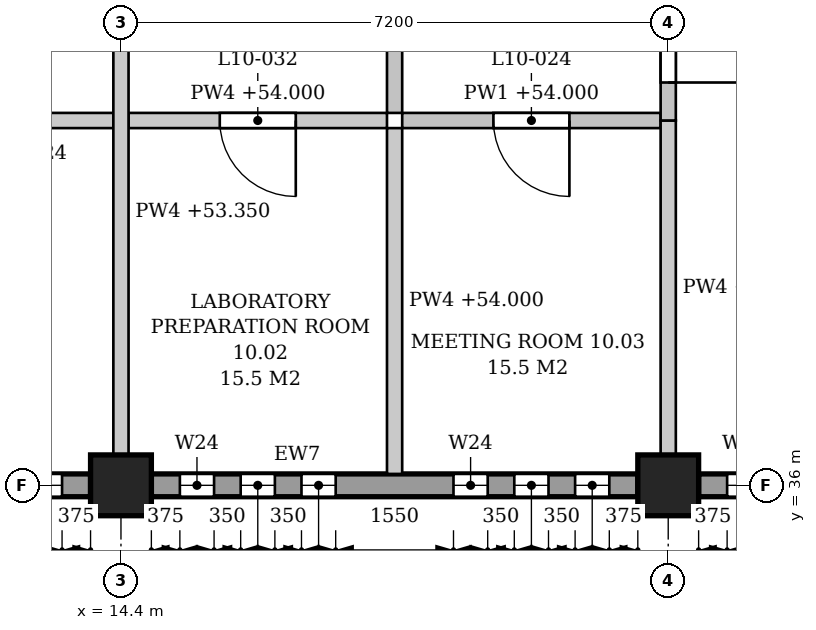
"""IFC4 building model, lengths in metres.
Left out: names, types, materials, properties, quantities, classifications, styles, units other than length and angle.
Written with IfcOpenShell. Run it as: python <this file> out.ifc"""

import sys

from ifc_helpers import new_model, si_unit, direction, frame, frame_2d, origin, origin_2d, place, context, subcontext, project, spatial, polyline, rectangle, outline, extrude, element, fill, save


model = new_model("IFC4")
c1 = context("Model", 3, precision=1e-05, world=origin(), true_north=direction((0.0, 1.0)))
c2 = subcontext(c1, "Body", "Model", "MODEL_VIEW")
j1 = project(units=[si_unit("LENGTHUNIT", "METRE"), si_unit("PLANEANGLEUNIT", "RADIAN")], contexts=[c1])
p1 = place(None, origin())
s1 = spatial("IfcSite", under=j1, at=p1, CompositionType="ELEMENT")
p2 = place(p1, origin())
s2 = spatial("IfcBuilding", under=s1, at=p2, CompositionType="ELEMENT")
p3 = place(p2, frame((0.0, 0.0, 49.8)))
s3 = spatial("IfcBuildingStorey", under=s2, at=p3, CompositionType="ELEMENT", Elevation=49.8)
for number, where, z_axis, x_axis in (
    (1, (14.4, 36.0, 0.0), (0.0, 0.0, 1.0), (1.0, 0.0, 0.0)),
    (2, (21.6, 36.0, 0.0), (0.0, 0.0, 1.0), (1.0, 0.0, 0.0)),
):
    element("IfcColumn", number, at=place(p3, frame(where, z_axis=z_axis, x_axis=x_axis)), inside=s3, PredefinedType="COLUMN", context=c2, shape_type="SweptSolid", body=[
        extrude(rectangle(XDim=0.8, YDim=0.8, at=origin_2d()), origin(), (0.0, 0.0, 1.0), 4.5),
    ])
p4 = place(p3, frame((7.6, 36.0, 0.0), z_axis=(0.0, 0.0, 1.0), x_axis=(1.0, 0.0, 0.0)))
e3 = element("IfcWall", 3, at=p4, inside=s3, PredefinedType="STANDARD", context=c2, shape_type="SweptSolid", body=[
    extrude(rectangle(XDim=6.4, YDim=0.3, at=frame_2d((3.2, 0.0))), origin(), (0.0, 0.0, 1.0), 3.6),
])
p5 = place(p4, frame((0.375, 0.0, 0.9)))
e4 = element("IfcOpeningElement", 4, at=p5, cuts=e3, PredefinedType="OPENING", context=c2, shape_type="SweptSolid", body=[
    extrude(outline(polyline([(0.0, 0.0), (0.45, 0.0), (0.45, 2.35), (0.225, 2.6), (0.0, 2.35), (0.0, 0.0)])), frame((0.0, 0.16, 0.0), z_axis=(0.0, -1.0, 0.0), x_axis=(1.0, 0.0, 0.0)), (0.0, 0.0, 1.0), 0.32),
])
p6 = place(p4, frame((1.175, 0.0, 0.9)))
e5 = element("IfcOpeningElement", 5, at=p6, cuts=e3, PredefinedType="OPENING", context=c2, shape_type="SweptSolid", body=[
    extrude(outline(polyline([(0.0, 0.0), (0.45, 0.0), (0.45, 2.35), (0.225, 2.6), (0.0, 2.35), (0.0, 0.0)])), frame((0.0, 0.16, 0.0), z_axis=(0.0, -1.0, 0.0), x_axis=(1.0, 0.0, 0.0)), (0.0, 0.0, 1.0), 0.32),
])
p7 = place(p4, frame((1.975, 0.0, 0.9)))
e6 = element("IfcOpeningElement", 6, at=p7, cuts=e3, PredefinedType="OPENING", context=c2, shape_type="SweptSolid", body=[
    extrude(outline(polyline([(0.0, 0.0), (0.45, 0.0), (0.45, 2.35), (0.225, 2.6), (0.0, 2.35), (0.0, 0.0)])), frame((0.0, 0.16, 0.0), z_axis=(0.0, -1.0, 0.0), x_axis=(1.0, 0.0, 0.0)), (0.0, 0.0, 1.0), 0.32),
])
p8 = place(p4, frame((3.975, 0.0, 0.9)))
e7 = element("IfcOpeningElement", 7, at=p8, cuts=e3, PredefinedType="OPENING", context=c2, shape_type="SweptSolid", body=[
    extrude(outline(polyline([(0.0, 0.0), (0.45, 0.0), (0.45, 2.35), (0.225, 2.6), (0.0, 2.35), (0.0, 0.0)])), frame((0.0, 0.16, 0.0), z_axis=(0.0, -1.0, 0.0), x_axis=(1.0, 0.0, 0.0)), (0.0, 0.0, 1.0), 0.32),
])
p9 = place(p4, frame((4.775, 0.0, 0.9)))
e8 = element("IfcOpeningElement", 8, at=p9, cuts=e3, PredefinedType="OPENING", context=c2, shape_type="SweptSolid", body=[
    extrude(outline(polyline([(0.0, 0.0), (0.45, 0.0), (0.45, 2.35), (0.225, 2.6), (0.0, 2.35), (0.0, 0.0)])), frame((0.0, 0.16, 0.0), z_axis=(0.0, -1.0, 0.0), x_axis=(1.0, 0.0, 0.0)), (0.0, 0.0, 1.0), 0.32),
])
p10 = place(p4, frame((5.575, 0.0, 0.9)))
e9 = element("IfcOpeningElement", 9, at=p10, cuts=e3, PredefinedType="OPENING", context=c2, shape_type="SweptSolid", body=[
    extrude(outline(polyline([(0.0, 0.0), (0.45, 0.0), (0.45, 2.35), (0.225, 2.6), (0.0, 2.35), (0.0, 0.0)])), frame((0.0, 0.16, 0.0), z_axis=(0.0, -1.0, 0.0), x_axis=(1.0, 0.0, 0.0)), (0.0, 0.0, 1.0), 0.32),
])
p11 = place(p3, frame((14.8, 36.0, 0.0), z_axis=(0.0, 0.0, 1.0), x_axis=(1.0, 0.0, 0.0)))
e10 = element("IfcWall", 10, at=p11, inside=s3, PredefinedType="STANDARD", context=c2, shape_type="SweptSolid", body=[
    extrude(rectangle(XDim=6.4, YDim=0.3, at=frame_2d((3.2, 0.0))), origin(), (0.0, 0.0, 1.0), 3.6),
])
p12 = place(p11, frame((0.375, 0.0, 0.9)))
e11 = element("IfcOpeningElement", 11, at=p12, cuts=e10, PredefinedType="OPENING", context=c2, shape_type="SweptSolid", body=[
    extrude(outline(polyline([(0.0, 0.0), (0.45, 0.0), (0.45, 2.35), (0.225, 2.6), (0.0, 2.35), (0.0, 0.0)])), frame((0.0, 0.16, 0.0), z_axis=(0.0, -1.0, 0.0), x_axis=(1.0, 0.0, 0.0)), (0.0, 0.0, 1.0), 0.32),
])
p13 = place(p11, frame((1.175, 0.0, 0.9)))
e12 = element("IfcOpeningElement", 12, at=p13, cuts=e10, PredefinedType="OPENING", context=c2, shape_type="SweptSolid", body=[
    extrude(outline(polyline([(0.0, 0.0), (0.45, 0.0), (0.45, 2.35), (0.225, 2.6), (0.0, 2.35), (0.0, 0.0)])), frame((0.0, 0.16, 0.0), z_axis=(0.0, -1.0, 0.0), x_axis=(1.0, 0.0, 0.0)), (0.0, 0.0, 1.0), 0.32),
])
p14 = place(p11, frame((1.975, 0.0, 0.9)))
e13 = element("IfcOpeningElement", 13, at=p14, cuts=e10, PredefinedType="OPENING", context=c2, shape_type="SweptSolid", body=[
    extrude(outline(polyline([(0.0, 0.0), (0.45, 0.0), (0.45, 2.35), (0.225, 2.6), (0.0, 2.35), (0.0, 0.0)])), frame((0.0, 0.16, 0.0), z_axis=(0.0, -1.0, 0.0), x_axis=(1.0, 0.0, 0.0)), (0.0, 0.0, 1.0), 0.32),
])
p15 = place(p11, frame((3.975, 0.0, 0.9)))
e14 = element("IfcOpeningElement", 14, at=p15, cuts=e10, PredefinedType="OPENING", context=c2, shape_type="SweptSolid", body=[
    extrude(outline(polyline([(0.0, 0.0), (0.45, 0.0), (0.45, 2.35), (0.225, 2.6), (0.0, 2.35), (0.0, 0.0)])), frame((0.0, 0.16, 0.0), z_axis=(0.0, -1.0, 0.0), x_axis=(1.0, 0.0, 0.0)), (0.0, 0.0, 1.0), 0.32),
])
p16 = place(p11, frame((4.775, 0.0, 0.9)))
e15 = element("IfcOpeningElement", 15, at=p16, cuts=e10, PredefinedType="OPENING", context=c2, shape_type="SweptSolid", body=[
    extrude(outline(polyline([(0.0, 0.0), (0.45, 0.0), (0.45, 2.35), (0.225, 2.6), (0.0, 2.35), (0.0, 0.0)])), frame((0.0, 0.16, 0.0), z_axis=(0.0, -1.0, 0.0), x_axis=(1.0, 0.0, 0.0)), (0.0, 0.0, 1.0), 0.32),
])
p17 = place(p11, frame((5.575, 0.0, 0.9)))
e16 = element("IfcOpeningElement", 16, at=p17, cuts=e10, PredefinedType="OPENING", context=c2, shape_type="SweptSolid", body=[
    extrude(outline(polyline([(0.0, 0.0), (0.45, 0.0), (0.45, 2.35), (0.225, 2.6), (0.0, 2.35), (0.0, 0.0)])), frame((0.0, 0.16, 0.0), z_axis=(0.0, -1.0, 0.0), x_axis=(1.0, 0.0, 0.0)), (0.0, 0.0, 1.0), 0.32),
])
p18 = place(p3, frame((22.0, 36.0, 0.0), z_axis=(0.0, 0.0, 1.0), x_axis=(1.0, 0.0, 0.0)))
e17 = element("IfcWall", 17, at=p18, inside=s3, PredefinedType="STANDARD", context=c2, shape_type="SweptSolid", body=[
    extrude(rectangle(XDim=6.4, YDim=0.3, at=frame_2d((3.2, 0.0))), origin(), (0.0, 0.0, 1.0), 3.6),
])
p19 = place(p18, frame((0.375, 0.0, 0.9)))
e18 = element("IfcOpeningElement", 18, at=p19, cuts=e17, PredefinedType="OPENING", context=c2, shape_type="SweptSolid", body=[
    extrude(outline(polyline([(0.0, 0.0), (0.45, 0.0), (0.45, 2.35), (0.225, 2.6), (0.0, 2.35), (0.0, 0.0)])), frame((0.0, 0.16, 0.0), z_axis=(0.0, -1.0, 0.0), x_axis=(1.0, 0.0, 0.0)), (0.0, 0.0, 1.0), 0.32),
])
p20 = place(p18, frame((1.175, 0.0, 0.9)))
e19 = element("IfcOpeningElement", 19, at=p20, cuts=e17, PredefinedType="OPENING", context=c2, shape_type="SweptSolid", body=[
    extrude(outline(polyline([(0.0, 0.0), (0.45, 0.0), (0.45, 2.35), (0.225, 2.6), (0.0, 2.35), (0.0, 0.0)])), frame((0.0, 0.16, 0.0), z_axis=(0.0, -1.0, 0.0), x_axis=(1.0, 0.0, 0.0)), (0.0, 0.0, 1.0), 0.32),
])
p21 = place(p18, frame((1.975, 0.0, 0.9)))
e20 = element("IfcOpeningElement", 20, at=p21, cuts=e17, PredefinedType="OPENING", context=c2, shape_type="SweptSolid", body=[
    extrude(outline(polyline([(0.0, 0.0), (0.45, 0.0), (0.45, 2.35), (0.225, 2.6), (0.0, 2.35), (0.0, 0.0)])), frame((0.0, 0.16, 0.0), z_axis=(0.0, -1.0, 0.0), x_axis=(1.0, 0.0, 0.0)), (0.0, 0.0, 1.0), 0.32),
])
p22 = place(p18, frame((3.975, 0.0, 0.9)))
e21 = element("IfcOpeningElement", 21, at=p22, cuts=e17, PredefinedType="OPENING", context=c2, shape_type="SweptSolid", body=[
    extrude(outline(polyline([(0.0, 0.0), (0.45, 0.0), (0.45, 2.35), (0.225, 2.6), (0.0, 2.35), (0.0, 0.0)])), frame((0.0, 0.16, 0.0), z_axis=(0.0, -1.0, 0.0), x_axis=(1.0, 0.0, 0.0)), (0.0, 0.0, 1.0), 0.32),
])
p23 = place(p18, frame((4.775, 0.0, 0.9)))
e22 = element("IfcOpeningElement", 22, at=p23, cuts=e17, PredefinedType="OPENING", context=c2, shape_type="SweptSolid", body=[
    extrude(outline(polyline([(0.0, 0.0), (0.45, 0.0), (0.45, 2.35), (0.225, 2.6), (0.0, 2.35), (0.0, 0.0)])), frame((0.0, 0.16, 0.0), z_axis=(0.0, -1.0, 0.0), x_axis=(1.0, 0.0, 0.0)), (0.0, 0.0, 1.0), 0.32),
])
p24 = place(p18, frame((5.575, 0.0, 0.9)))
e23 = element("IfcOpeningElement", 23, at=p24, cuts=e17, PredefinedType="OPENING", context=c2, shape_type="SweptSolid", body=[
    extrude(outline(polyline([(0.0, 0.0), (0.45, 0.0), (0.45, 2.35), (0.225, 2.6), (0.0, 2.35), (0.0, 0.0)])), frame((0.0, 0.16, 0.0), z_axis=(0.0, -1.0, 0.0), x_axis=(1.0, 0.0, 0.0)), (0.0, 0.0, 1.0), 0.32),
])
p25 = place(p3, frame((3.7, 40.8, 0.0), z_axis=(0.0, 0.0, 1.0), x_axis=(1.0, 0.0, 0.0)))
e24 = element("IfcWall", 24, at=p25, inside=s3, PredefinedType="PARTITIONING", context=c2, shape_type="SweptSolid", body=[
    extrude(outline(polyline([(0.0, 0.0), (10.6, 0.0), (10.6, 3.55), (10.475, 3.55), (10.475, 4.2), (3.725, 4.2), (3.725, 3.55), (3.275, 3.55), (3.275, 4.2), (0.0, 4.2), (0.0, 0.0)])), frame((0.0, 0.1, 0.0), z_axis=(0.0, -1.0, 0.0), x_axis=(1.0, 0.0, 0.0)), (0.0, 0.0, 1.0), 0.2),
])
p26 = place(p25, frame((1.25, 0.0, 0.0)))
e25 = element("IfcOpeningElement", 25, at=p26, cuts=e24, PredefinedType="OPENING", context=c2, shape_type="SweptSolid", body=[
    extrude(rectangle(XDim=1.0, YDim=2.1, at=frame_2d((0.5, 1.05))), frame((0.0, 0.11, 0.0), z_axis=(0.0, -1.0, 0.0), x_axis=(1.0, 0.0, 0.0)), (0.0, 0.0, 1.0), 0.22),
])
p27 = place(p25, frame((6.55, 0.0, 0.0)))
e26 = element("IfcOpeningElement", 26, at=p27, cuts=e24, PredefinedType="OPENING", context=c2, shape_type="SweptSolid", body=[
    extrude(rectangle(XDim=1.0, YDim=2.1, at=frame_2d((0.5, 1.05))), frame((0.0, 0.11, 0.0), z_axis=(0.0, -1.0, 0.0), x_axis=(1.0, 0.0, 0.0)), (0.0, 0.0, 1.0), 0.22),
])
p28 = place(p3, frame((14.5, 40.8, 0.0), z_axis=(0.0, 0.0, 1.0), x_axis=(1.0, 0.0, 0.0)))
e27 = element("IfcWall", 27, at=p28, inside=s3, PredefinedType="PARTITIONING", context=c2, shape_type="SweptSolid", body=[
    extrude(outline(polyline([(0.0, 0.0), (3.4, 0.0), (3.4, 4.2), (0.125, 4.2), (0.125, 3.55), (0.0, 3.55), (0.0, 0.0)])), frame((0.0, 0.1, 0.0), z_axis=(0.0, -1.0, 0.0), x_axis=(1.0, 0.0, 0.0)), (0.0, 0.0, 1.0), 0.2),
])
p29 = place(p28, frame((1.2, 0.0, 0.0)))
e28 = element("IfcOpeningElement", 28, at=p29, cuts=e27, PredefinedType="OPENING", context=c2, shape_type="SweptSolid", body=[
    extrude(rectangle(XDim=1.0, YDim=2.1, at=frame_2d((0.5, 1.05))), frame((0.0, 0.11, 0.0), z_axis=(0.0, -1.0, 0.0), x_axis=(1.0, 0.0, 0.0)), (0.0, 0.0, 1.0), 0.22),
])
p30 = place(p3, frame((18.1, 40.8, 0.0), z_axis=(0.0, 0.0, 1.0), x_axis=(1.0, 0.0, 0.0)))
e29 = element("IfcWall", 29, at=p30, inside=s3, PredefinedType="PARTITIONING", context=c2, shape_type="SweptSolid", body=[
    extrude(outline(polyline([(0.0, 0.0), (3.4, 0.0), (3.4, 3.55), (3.275, 3.55), (3.275, 4.2), (0.0, 4.2), (0.0, 0.0)])), frame((0.0, 0.1, 0.0), z_axis=(0.0, -1.0, 0.0), x_axis=(1.0, 0.0, 0.0)), (0.0, 0.0, 1.0), 0.2),
])
p31 = place(p30, frame((1.2, 0.0, 0.0)))
e30 = element("IfcOpeningElement", 30, at=p31, cuts=e29, PredefinedType="OPENING", context=c2, shape_type="SweptSolid", body=[
    extrude(rectangle(XDim=1.0, YDim=2.1, at=frame_2d((0.5, 1.05))), frame((0.0, 0.11, 0.0), z_axis=(0.0, -1.0, 0.0), x_axis=(1.0, 0.0, 0.0)), (0.0, 0.0, 1.0), 0.22),
])
p32 = place(p3, frame((14.4, 36.4, 0.0), z_axis=(0.0, 0.0, 1.0), x_axis=(0.0, 1.0, 0.0)))
e31 = element("IfcWall", 31, at=p32, inside=s3, PredefinedType="PARTITIONING", context=c2, shape_type="SweptSolid", body=[
    extrude(rectangle(XDim=6.4, YDim=0.2, at=frame_2d((3.2, 0.0))), origin(), (0.0, 0.0, 1.0), 3.55),
])
p33 = place(p3, frame((18.0, 36.15, 0.0), z_axis=(0.0, 0.0, 1.0), x_axis=(0.0, 1.0, 0.0)))
e32 = element("IfcWall", 32, at=p33, inside=s3, PredefinedType="PARTITIONING", context=c2, shape_type="SweptSolid", body=[
    extrude(outline(polyline([(0.0, 0.0), (4.55, 0.0), (4.55, 4.2), (0.05, 4.2), (0.05, 3.6), (0.0, 3.6), (0.0, 0.0)])), frame((0.0, 0.1, 0.0), z_axis=(0.0, -1.0, 0.0), x_axis=(1.0, 0.0, 0.0)), (0.0, 0.0, 1.0), 0.2),
])
p34 = place(p3, frame((18.0, 40.9, 0.0), z_axis=(0.0, 0.0, 1.0), x_axis=(0.0, 1.0, 0.0)))
e33 = element("IfcWall", 33, at=p34, inside=s3, PredefinedType="PARTITIONING", context=c2, shape_type="SweptSolid", body=[
    extrude(outline(polyline([(0.0, 0.0), (7.0, 0.0), (7.0, 4.2), (2.525, 4.2), (2.525, 3.55), (2.075, 3.55), (2.075, 4.2), (0.0, 4.2), (0.0, 0.0)])), frame((0.0, 0.1, 0.0), z_axis=(0.0, -1.0, 0.0), x_axis=(1.0, 0.0, 0.0)), (0.0, 0.0, 1.0), 0.2),
])
p35 = place(p34, frame((3.0, 0.0, 0.0)))
e34 = element("IfcOpeningElement", 34, at=p35, cuts=e33, PredefinedType="OPENING", context=c2, shape_type="SweptSolid", body=[
    extrude(rectangle(XDim=1.0, YDim=2.1, at=frame_2d((0.5, 1.05))), frame((0.0, 0.11, 0.0), z_axis=(0.0, -1.0, 0.0), x_axis=(1.0, 0.0, 0.0)), (0.0, 0.0, 1.0), 0.22),
])
p36 = place(p3, frame((21.6, 36.4, 0.0), z_axis=(0.0, 0.0, 1.0), x_axis=(0.0, 1.0, 0.0)))
e35 = element("IfcWall", 35, at=p36, inside=s3, PredefinedType="PARTITIONING", context=c2, shape_type="SweptSolid", body=[
    extrude(rectangle(XDim=4.4, YDim=0.2, at=frame_2d((2.2, 0.0))), origin(), (0.0, 0.0, 1.0), 3.55),
])
p37 = place(p3, frame((21.6, 40.8, 0.0), z_axis=(0.0, 0.0, 1.0), x_axis=(0.0, 1.0, 0.0)))
e36 = element("IfcWall", 36, at=p37, inside=s3, PredefinedType="PARTITIONING", context=c2, shape_type="SweptSolid", body=[
    extrude(rectangle(XDim=2.0, YDim=0.2, at=frame_2d((1.0, 0.0))), origin(), (0.0, 0.0, 1.0), 3.55),
])
p38 = place(p37, frame((0.5, 0.0, 0.0)))
e37 = element("IfcOpeningElement", 37, at=p38, cuts=e36, PredefinedType="OPENING", context=c2, shape_type="SweptSolid", body=[
    extrude(rectangle(XDim=1.0, YDim=2.1, at=frame_2d((0.5, 1.05))), frame((0.0, 0.11, 0.0), z_axis=(0.0, -1.0, 0.0), x_axis=(1.0, 0.0, 0.0)), (0.0, 0.0, 1.0), 0.22),
])
p39 = place(p10, origin())
e38 = element("IfcWindow", 38, at=p39, inside=s3, PartitioningType="SINGLE_PANEL", PredefinedType="WINDOW", context=c2, shape_type="SweptSolid", body=[
    extrude(outline(polyline([(0.0, 0.0), (0.45, 0.0), (0.45, 2.35), (0.225, 2.6), (0.0, 2.35), (0.0, 0.0)])), frame((0.0, 0.03, 0.0), z_axis=(0.0, -1.0, 0.0), x_axis=(1.0, 0.0, 0.0)), (0.0, 0.0, 1.0), 0.06),
])
fill(e9, e38)
p40 = place(p12, origin())
e39 = element("IfcWindow", 39, at=p40, inside=s3, PartitioningType="SINGLE_PANEL", PredefinedType="WINDOW", context=c2, shape_type="SweptSolid", body=[
    extrude(outline(polyline([(0.0, 0.0), (0.45, 0.0), (0.45, 2.35), (0.225, 2.6), (0.0, 2.35), (0.0, 0.0)])), frame((0.0, 0.03, 0.0), z_axis=(0.0, -1.0, 0.0), x_axis=(1.0, 0.0, 0.0)), (0.0, 0.0, 1.0), 0.06),
])
fill(e11, e39)
p41 = place(p13, origin())
e40 = element("IfcWindow", 40, at=p41, inside=s3, PartitioningType="SINGLE_PANEL", PredefinedType="WINDOW", context=c2, shape_type="SweptSolid", body=[
    extrude(outline(polyline([(0.0, 0.0), (0.45, 0.0), (0.45, 2.35), (0.225, 2.6), (0.0, 2.35), (0.0, 0.0)])), frame((0.0, 0.03, 0.0), z_axis=(0.0, -1.0, 0.0), x_axis=(1.0, 0.0, 0.0)), (0.0, 0.0, 1.0), 0.06),
])
fill(e12, e40)
p42 = place(p14, origin())
e41 = element("IfcWindow", 41, at=p42, inside=s3, PartitioningType="SINGLE_PANEL", PredefinedType="WINDOW", context=c2, shape_type="SweptSolid", body=[
    extrude(outline(polyline([(0.0, 0.0), (0.45, 0.0), (0.45, 2.35), (0.225, 2.6), (0.0, 2.35), (0.0, 0.0)])), frame((0.0, 0.03, 0.0), z_axis=(0.0, -1.0, 0.0), x_axis=(1.0, 0.0, 0.0)), (0.0, 0.0, 1.0), 0.06),
])
fill(e13, e41)
p43 = place(p15, origin())
e42 = element("IfcWindow", 42, at=p43, inside=s3, PartitioningType="SINGLE_PANEL", PredefinedType="WINDOW", context=c2, shape_type="SweptSolid", body=[
    extrude(outline(polyline([(0.0, 0.0), (0.45, 0.0), (0.45, 2.35), (0.225, 2.6), (0.0, 2.35), (0.0, 0.0)])), frame((0.0, 0.03, 0.0), z_axis=(0.0, -1.0, 0.0), x_axis=(1.0, 0.0, 0.0)), (0.0, 0.0, 1.0), 0.06),
])
fill(e14, e42)
p44 = place(p16, origin())
e43 = element("IfcWindow", 43, at=p44, inside=s3, PartitioningType="SINGLE_PANEL", PredefinedType="WINDOW", context=c2, shape_type="SweptSolid", body=[
    extrude(outline(polyline([(0.0, 0.0), (0.45, 0.0), (0.45, 2.35), (0.225, 2.6), (0.0, 2.35), (0.0, 0.0)])), frame((0.0, 0.03, 0.0), z_axis=(0.0, -1.0, 0.0), x_axis=(1.0, 0.0, 0.0)), (0.0, 0.0, 1.0), 0.06),
])
fill(e15, e43)
p45 = place(p17, origin())
e44 = element("IfcWindow", 44, at=p45, inside=s3, PartitioningType="SINGLE_PANEL", PredefinedType="WINDOW", context=c2, shape_type="SweptSolid", body=[
    extrude(outline(polyline([(0.0, 0.0), (0.45, 0.0), (0.45, 2.35), (0.225, 2.6), (0.0, 2.35), (0.0, 0.0)])), frame((0.0, 0.03, 0.0), z_axis=(0.0, -1.0, 0.0), x_axis=(1.0, 0.0, 0.0)), (0.0, 0.0, 1.0), 0.06),
])
fill(e16, e44)
p46 = place(p19, origin())
e45 = element("IfcWindow", 45, at=p46, inside=s3, PartitioningType="SINGLE_PANEL", PredefinedType="WINDOW", context=c2, shape_type="SweptSolid", body=[
    extrude(outline(polyline([(0.0, 0.0), (0.45, 0.0), (0.45, 2.35), (0.225, 2.6), (0.0, 2.35), (0.0, 0.0)])), frame((0.0, 0.03, 0.0), z_axis=(0.0, -1.0, 0.0), x_axis=(1.0, 0.0, 0.0)), (0.0, 0.0, 1.0), 0.06),
])
fill(e18, e45)
p47 = place(p31, frame((1.0, 0.0, 0.0), z_axis=(0.0, 0.0, 1.0), x_axis=(-1.0, 0.0, 0.0)))
e46 = element("IfcDoor", 46, at=p47, inside=s3, OperationType="SINGLE_SWING_LEFT", PredefinedType="DOOR", context=c2, shape_type="SweptSolid", body=[
    extrude(rectangle(XDim=1.0, YDim=2.1, at=frame_2d((0.5, 1.05))), frame((0.0, 0.025, 0.0), z_axis=(0.0, -1.0, 0.0), x_axis=(1.0, 0.0, 0.0)), (0.0, 0.0, 1.0), 0.05),
])
fill(e30, e46)
p48 = place(p38, frame((1.0, 0.0, 0.0), z_axis=(0.0, 0.0, 1.0), x_axis=(-1.0, 0.0, 0.0)))
e47 = element("IfcDoor", 47, at=p48, inside=s3, OperationType="SINGLE_SWING_RIGHT", PredefinedType="DOOR", context=c2, shape_type="SweptSolid", body=[
    extrude(rectangle(XDim=1.0, YDim=2.1, at=frame_2d((0.5, 1.05))), frame((0.0, 0.025, 0.0), z_axis=(0.0, -1.0, 0.0), x_axis=(1.0, 0.0, 0.0)), (0.0, 0.0, 1.0), 0.05),
])
fill(e37, e47)
p49 = place(p29, frame((1.0, 0.0, 0.0), z_axis=(0.0, 0.0, 1.0), x_axis=(-1.0, 0.0, 0.0)))
e48 = element("IfcDoor", 48, at=p49, inside=s3, OperationType="SINGLE_SWING_LEFT", PredefinedType="DOOR", context=c2, shape_type="SweptSolid", body=[
    extrude(rectangle(XDim=1.0, YDim=2.1, at=frame_2d((0.5, 1.05))), frame((0.0, 0.025, 0.0), z_axis=(0.0, -1.0, 0.0), x_axis=(1.0, 0.0, 0.0)), (0.0, 0.0, 1.0), 0.05),
])
fill(e28, e48)
save(model, sys.argv[1])
